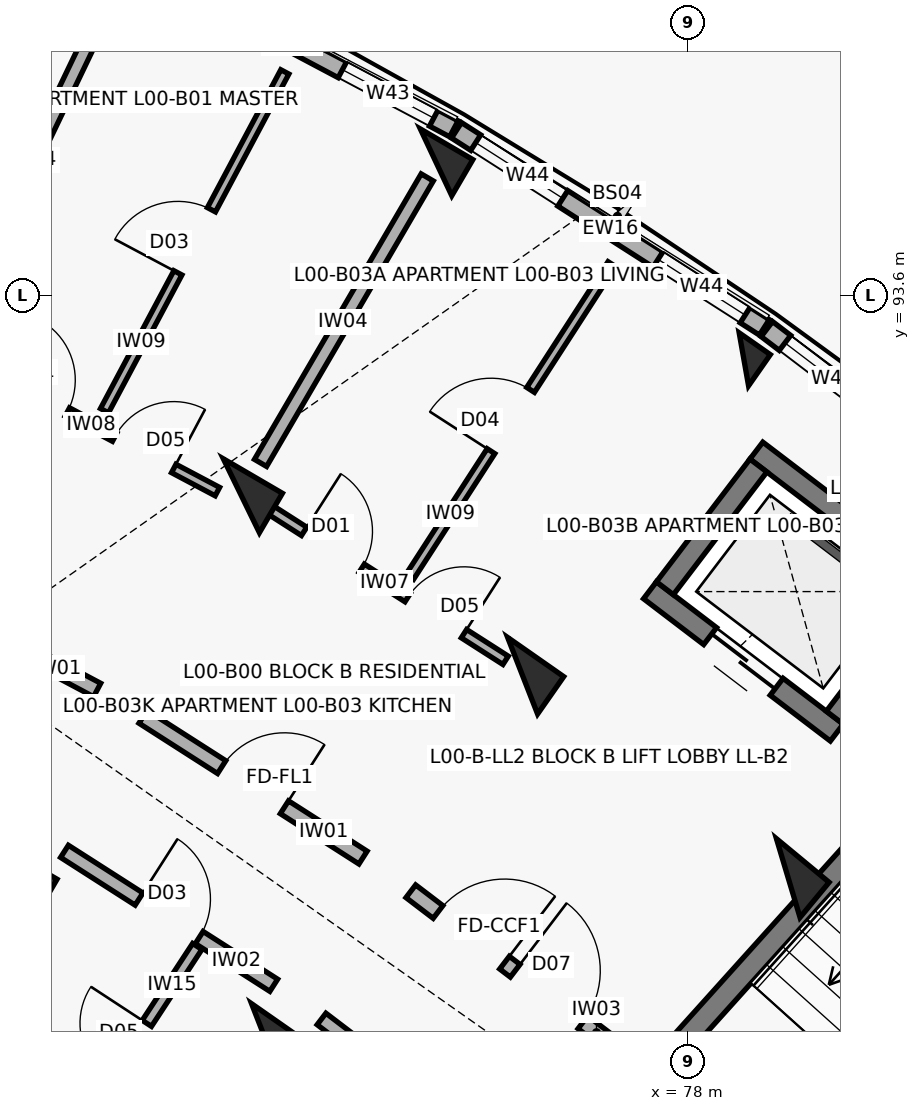
"""IFC4 building model, lengths in metres.
Left out: names, types, materials, properties, quantities, classifications, styles, units other than length and angle.
Written with IfcOpenShell. Run it as: python <this file> out.ifc"""

import sys

from ifc_helpers import new_model, si_unit, direction, frame, frame_2d, origin, origin_2d, place, context, subcontext, project, spatial, rectangle, extrude, element, fill, save


model = new_model("IFC4")
c1 = context("Model", 3, precision=1e-05, world=origin(), true_north=direction((0.0, 1.0)))
c2 = subcontext(c1, "Body", "Model", "MODEL_VIEW")
j1 = project(units=[si_unit("LENGTHUNIT", "METRE"), si_unit("PLANEANGLEUNIT", "RADIAN")], contexts=[c1])
p1 = place(None, origin())
s1 = spatial("IfcSite", under=j1, at=p1, CompositionType="ELEMENT")
p2 = place(p1, origin())
s2 = spatial("IfcBuilding", under=s1, at=p2, CompositionType="ELEMENT")
p3 = place(p2, origin())
s3 = spatial("IfcBuildingStorey", under=s2, at=p3, CompositionType="ELEMENT", Elevation=0.0)
for number, where, z_axis, x_axis in (
    (1, (69.163, 85.882, 0.0), (0.0, 0.0, 1.0), (0.504, 0.864, 0.0)),
    (2, (72.127, 90.96, 0.0), (0.0, 0.0, 1.0), (0.504, 0.864, 0.0)),
):
    element("IfcColumn", number, at=place(p3, frame(where, z_axis=z_axis, x_axis=x_axis)), inside=s3, PredefinedType="COLUMN", context=c2, shape_type="SweptSolid", body=[
        extrude(rectangle(XDim=0.6, YDim=0.9, at=origin_2d()), origin(), (0.0, 0.0, 1.0), 4.5),
    ])
p4 = place(p3, frame((74.689, 95.347, 0.0), z_axis=(0.0, 0.0, 1.0), x_axis=(0.504226211181, 0.863571611366, 0.0)))
e3 = element("IfcColumn", 3, at=p4, inside=s3, PredefinedType="COLUMN", context=c2, shape_type="SweptSolid", body=[
    extrude(rectangle(XDim=0.55, YDim=0.8, at=origin_2d()), origin(), (0.0, 0.0, 1.0), 4.5),
])
for number, where, z_axis, x_axis in (
    (4, (72.458, 83.773, 0.0), (0.0, 0.0, 1.0), (0.573, 0.82, 0.0)),
    (5, (75.828, 88.592, 0.0), (0.0, 0.0, 1.0), (0.573, 0.82, 0.0)),
):
    element("IfcColumn", number, at=place(p3, frame(where, z_axis=z_axis, x_axis=x_axis)), inside=s3, PredefinedType="COLUMN", context=c2, shape_type="SweptSolid", body=[
        extrude(rectangle(XDim=0.6, YDim=0.9, at=origin_2d()), origin(), (0.0, 0.0, 1.0), 4.5),
    ])
p5 = place(p3, frame((78.739, 92.755, 0.0), z_axis=(0.0, 0.0, 1.0), x_axis=(0.573004420611, 0.819552276527, 0.0)))
e6 = element("IfcColumn", 6, at=p5, inside=s3, PredefinedType="COLUMN", context=c2, shape_type="SweptSolid", body=[
    extrude(rectangle(XDim=0.5, YDim=0.5, at=origin_2d()), origin(), (0.0, 0.0, 1.0), 4.5),
])
p6 = place(p3, frame((79.322, 85.93, 0.0), z_axis=(0.0, 0.0, 1.0), x_axis=(0.637961754089, 0.770068049148, 0.0)))
e7 = element("IfcColumn", 7, at=p6, inside=s3, PredefinedType="COLUMN", context=c2, shape_type="SweptSolid", body=[
    extrude(rectangle(XDim=0.6, YDim=0.9, at=origin_2d()), origin(), (0.0, 0.0, 1.0), 4.5),
])
p7 = place(p3, frame((70.675, 98.042, 0.0), z_axis=(0.0, 0.0, 1.0), x_axis=(0.883448093208, -0.468529045639, 0.0)))
e8 = element("IfcWall", 8, at=p7, inside=s3, PredefinedType="SOLIDWALL", context=c2, shape_type="SweptSolid", body=[
    extrude(rectangle(XDim=4.809, YDim=0.238, at=frame_2d((2.405, 0.0))), origin(), (0.0, 0.0, 1.0), 3.45),
])
p8 = place(p7, frame((0.3, 0.0, 0.3)))
e9 = element("IfcOpeningElement", 9, at=p8, cuts=e8, PredefinedType="OPENING", context=c2, shape_type="SweptSolid", body=[
    extrude(rectangle(XDim=1.36, YDim=1.42, at=frame_2d((0.68, 0.71))), frame((0.0, 0.129, 0.0), z_axis=(0.0, -1.0, 0.0), x_axis=(1.0, 0.0, 0.0)), (0.0, 0.0, 1.0), 0.258),
])
p9 = place(p7, frame((3.149, 0.0, 0.3)))
e10 = element("IfcOpeningElement", 10, at=p9, cuts=e8, PredefinedType="OPENING", context=c2, shape_type="SweptSolid", body=[
    extrude(rectangle(XDim=1.36, YDim=1.42, at=frame_2d((0.68, 0.71))), frame((0.0, 0.129, 0.0), z_axis=(0.0, -1.0, 0.0), x_axis=(1.0, 0.0, 0.0)), (0.0, 0.0, 1.0), 0.258),
])
p10 = place(p3, frame((74.958, 95.768, 0.0), z_axis=(0.0, 0.0, 1.0), x_axis=(0.84226218024, -0.539068103061, 0.0)))
e11 = element("IfcWall", 11, at=p10, inside=s3, PredefinedType="SOLIDWALL", context=c2, shape_type="SweptSolid", body=[
    extrude(rectangle(XDim=4.809, YDim=0.242, at=frame_2d((2.404, 0.0))), origin(), (0.0, 0.0, 1.0), 3.45),
])
p11 = place(p10, frame((0.3, 0.0, 0.3)))
e12 = element("IfcOpeningElement", 12, at=p11, cuts=e11, PredefinedType="OPENING", context=c2, shape_type="SweptSolid", body=[
    extrude(rectangle(XDim=1.36, YDim=1.56, at=frame_2d((0.68, 0.78))), frame((0.0, 0.131, 0.0), z_axis=(0.0, -1.0, 0.0), x_axis=(1.0, 0.0, 0.0)), (0.0, 0.0, 1.0), 0.262),
])
p12 = place(p10, frame((3.149, 0.0, 0.3)))
e13 = element("IfcOpeningElement", 13, at=p12, cuts=e11, PredefinedType="OPENING", context=c2, shape_type="SweptSolid", body=[
    extrude(rectangle(XDim=1.36, YDim=1.56, at=frame_2d((0.68, 0.78))), frame((0.0, 0.131, 0.0), z_axis=(0.0, -1.0, 0.0), x_axis=(1.0, 0.0, 0.0)), (0.0, 0.0, 1.0), 0.262),
])
p13 = place(p3, frame((79.041, 93.153, 0.0), z_axis=(0.0, 0.0, 1.0), x_axis=(0.795469013207, -0.605994264848, 0.0)))
e14 = element("IfcWall", 14, at=p13, inside=s3, PredefinedType="SOLIDWALL", context=c2, shape_type="SweptSolid", body=[
    extrude(rectangle(XDim=4.809, YDim=0.248, at=frame_2d((2.404, 0.0))), origin(), (0.0, 0.0, 1.0), 3.45),
])
p14 = place(p13, frame((0.3, 0.0, 0.3)))
e15 = element("IfcOpeningElement", 15, at=p14, cuts=e14, PredefinedType="OPENING", context=c2, shape_type="SweptSolid", body=[
    extrude(rectangle(XDim=1.48, YDim=1.16, at=frame_2d((0.74, 0.58))), frame((0.0, 0.134, 0.0), z_axis=(0.0, -1.0, 0.0), x_axis=(1.0, 0.0, 0.0)), (0.0, 0.0, 1.0), 0.268),
])
p15 = place(p13, frame((3.029, 0.0, 0.3)))
e16 = element("IfcOpeningElement", 16, at=p15, cuts=e14, PredefinedType="OPENING", context=c2, shape_type="SweptSolid", body=[
    extrude(rectangle(XDim=1.48, YDim=1.16, at=frame_2d((0.74, 0.58))), frame((0.0, 0.134, 0.0), z_axis=(0.0, -1.0, 0.0), x_axis=(1.0, 0.0, 0.0)), (0.0, 0.0, 1.0), 0.268),
])
p16 = place(p3, frame((77.655, 83.461, 0.0), z_axis=(0.0, 0.0, 1.0), x_axis=(0.668868253964, 0.743380964808, 0.0)))
e17 = element("IfcWall", 17, at=p16, inside=s3, PredefinedType="SHEAR", context=c2, shape_type="SweptSolid", body=[
    extrude(rectangle(XDim=7.69, YDim=0.3, at=frame_2d((3.845, 0.0))), origin(), (0.0, 0.0, 1.0), 4.5),
])
p17 = place(p3, frame((79.961, 87.844, 0.0), z_axis=(0.0, 0.0, 1.0), x_axis=(-0.795464365424, 0.606000365793, 0.0)))
e18 = element("IfcWall", 18, at=p17, inside=s3, PredefinedType="SHEAR", context=c2, shape_type="SweptSolid", body=[
    extrude(rectangle(XDim=3.09, YDim=0.28, at=frame_2d((1.545, 0.0))), origin(), (0.0, 0.0, 1.0), 4.5),
])
p18 = place(p17, frame((0.995, 0.0, 0.0)))
e19 = element("IfcOpeningElement", 19, at=p18, cuts=e18, PredefinedType="OPENING", context=c2, shape_type="SweptSolid", body=[
    extrude(rectangle(XDim=1.1, YDim=2.15, at=frame_2d((0.55, 1.075))), frame((0.0, 0.15, 0.0), z_axis=(0.0, -1.0, 0.0), x_axis=(1.0, 0.0, 0.0)), (0.0, 0.0, 1.0), 0.3),
])
p19 = place(p3, frame((81.361, 89.681, 0.0), z_axis=(0.0, 0.0, 1.0), x_axis=(-0.795502452183, 0.605950368076, 0.0)))
e20 = element("IfcWall", 20, at=p19, inside=s3, PredefinedType="SHEAR", context=c2, shape_type="SweptSolid", body=[
    extrude(rectangle(XDim=3.09, YDim=0.28, at=frame_2d((1.545, 0.0))), origin(), (0.0, 0.0, 1.0), 4.5),
])
for number, where, z_axis, x_axis in (
    (21, (79.935, 88.04, 0.0), (0.0, 0.0, 1.0), (0.606, 0.795, 0.0)),
    (22, (77.699, 89.743, 0.0), (0.0, 0.0, 1.0), (0.606, 0.795, 0.0)),
):
    element("IfcWall", number, at=place(p3, frame(where, z_axis=z_axis, x_axis=x_axis)), inside=s3, PredefinedType="SHEAR", context=c2, shape_type="SweptSolid", body=[
        extrude(rectangle(XDim=2.03, YDim=0.28, at=frame_2d((1.015, 0.0))), origin(), (0.0, 0.0, 1.0), 4.5),
    ])
p20 = place(p3, frame((67.194, 90.014, 0.0), z_axis=(0.0, 0.0, 1.0), x_axis=(0.883410853063, -0.468599258099, 0.0)))
e23 = element("IfcWall", 23, at=p20, inside=s3, PredefinedType="SOLIDWALL", context=c2, shape_type="SweptSolid", body=[
    extrude(rectangle(XDim=3.436, YDim=0.2, at=frame_2d((1.718, 0.0))), origin(), (0.0, 0.0, 1.0), 3.34),
])
p21 = place(p20, frame((1.208, 0.0, 0.0)))
e24 = element("IfcOpeningElement", 24, at=p21, cuts=e23, PredefinedType="OPENING", context=c2, shape_type="SweptSolid", body=[
    extrude(rectangle(XDim=1.02, YDim=2.15, at=frame_2d((0.51, 1.075))), frame((0.0, 0.11, 0.0), z_axis=(0.0, -1.0, 0.0), x_axis=(1.0, 0.0, 0.0)), (0.0, 0.0, 1.0), 0.22),
])
p22 = place(p3, frame((68.468, 92.788, 0.0), z_axis=(0.0, 0.0, 1.0), x_axis=(0.883450371448, -0.468524749814, 0.0)))
e25 = element("IfcWall", 25, at=p22, inside=s3, PredefinedType="PARTITIONING", context=c2, shape_type="SweptSolid", body=[
    extrude(rectangle(XDim=3.785, YDim=0.125, at=frame_2d((1.893, 0.0))), origin(), (0.0, 0.0, 1.0), 3.34),
])
p23 = place(p22, frame((0.65, 0.0, 0.0)))
e26 = element("IfcOpeningElement", 26, at=p23, cuts=e25, PredefinedType="OPENING", context=c2, shape_type="SweptSolid", body=[
    extrude(rectangle(XDim=0.9, YDim=2.1, at=frame_2d((0.45, 1.05))), frame((0.0, 0.073, 0.0), z_axis=(0.0, -1.0, 0.0), x_axis=(1.0, 0.0, 0.0)), (0.0, 0.0, 1.0), 0.145),
])
p24 = place(p22, frame((2.255, 0.0, 0.0)))
e27 = element("IfcOpeningElement", 27, at=p24, cuts=e25, PredefinedType="OPENING", context=c2, shape_type="SweptSolid", body=[
    extrude(rectangle(XDim=0.88, YDim=2.1, at=frame_2d((0.44, 1.05))), frame((0.0, 0.073, 0.0), z_axis=(0.0, -1.0, 0.0), x_axis=(1.0, 0.0, 0.0)), (0.0, 0.0, 1.0), 0.145),
])
p25 = place(p3, frame((70.326, 92.079, 0.0), z_axis=(0.0, 0.0, 1.0), x_axis=(0.469847866249, 0.882747405876, 0.0)))
e28 = element("IfcWall", 28, at=p25, inside=s3, PredefinedType="PARTITIONING", context=c2, shape_type="SweptSolid", body=[
    extrude(rectangle(XDim=5.05, YDim=0.12, at=frame_2d((2.525, 0.0))), origin(), (0.0, 0.0, 1.0), 3.34),
])
p26 = place(p25, frame((2.055, 0.0, 0.0)))
e29 = element("IfcOpeningElement", 29, at=p26, cuts=e28, PredefinedType="OPENING", context=c2, shape_type="SweptSolid", body=[
    extrude(rectangle(XDim=0.94, YDim=2.1, at=frame_2d((0.47, 1.05))), frame((0.0, 0.07, 0.0), z_axis=(0.0, -1.0, 0.0), x_axis=(1.0, 0.0, 0.0)), (0.0, 0.0, 1.0), 0.14),
])
p27 = place(p3, frame((68.462, 93.469, 0.0), z_axis=(0.0, 0.0, 1.0), x_axis=(0.432086898897, 0.901831975371, 0.0)))
e30 = element("IfcWall", 30, at=p27, inside=s3, PredefinedType="SOLIDWALL", context=c2, shape_type="SweptSolid", body=[
    extrude(rectangle(XDim=4.35, YDim=0.185, at=frame_2d((2.175, 0.0))), origin(), (0.0, 0.0, 1.0), 3.34),
])
p28 = place(p3, frame((70.834, 88.051, 0.0), z_axis=(0.0, 0.0, 1.0), x_axis=(0.842257205985, -0.539075874963, 0.0)))
e31 = element("IfcWall", 31, at=p28, inside=s3, PredefinedType="SOLIDWALL", context=c2, shape_type="SweptSolid", body=[
    extrude(rectangle(XDim=3.436, YDim=0.2, at=frame_2d((1.718, 0.0))), origin(), (0.0, 0.0, 1.0), 3.34),
])
p29 = place(p28, frame((1.228, 0.0, 0.0)))
e32 = element("IfcOpeningElement", 32, at=p29, cuts=e31, PredefinedType="OPENING", context=c2, shape_type="SweptSolid", body=[
    extrude(rectangle(XDim=0.98, YDim=2.15, at=frame_2d((0.49, 1.075))), frame((0.0, 0.11, 0.0), z_axis=(0.0, -1.0, 0.0), x_axis=(1.0, 0.0, 0.0)), (0.0, 0.0, 1.0), 0.22),
])
p30 = place(p3, frame((69.8, 86.281, 0.0), z_axis=(0.0, 0.0, 1.0), x_axis=(0.842225276846, -0.539125758095, 0.0)))
e33 = element("IfcWall", 33, at=p30, inside=s3, PredefinedType="SOLIDWALL", context=c2, shape_type="SweptSolid", body=[
    extrude(rectangle(XDim=3.269, YDim=0.19, at=frame_2d((1.634, 0.0))), origin(), (0.0, 0.0, 1.0), 3.34),
])
p31 = place(p30, frame((1.164, 0.0, 0.0)))
e34 = element("IfcOpeningElement", 34, at=p31, cuts=e33, PredefinedType="OPENING", context=c2, shape_type="SweptSolid", body=[
    extrude(rectangle(XDim=0.94, YDim=2.1, at=frame_2d((0.47, 1.05))), frame((0.0, 0.105, 0.0), z_axis=(0.0, -1.0, 0.0), x_axis=(1.0, 0.0, 0.0)), (0.0, 0.0, 1.0), 0.21),
])
p32 = place(p3, frame((69.739, 82.269, 0.0), z_axis=(0.0, 0.0, 1.0), x_axis=(0.547920940513, 0.836530120765, 0.0)))
e35 = element("IfcWall", 35, at=p32, inside=s3, PredefinedType="PARTITIONING", context=c2, shape_type="SweptSolid", body=[
    extrude(rectangle(XDim=3.3, YDim=0.145, at=frame_2d((1.65, 0.0))), origin(), (0.0, 0.0, 1.0), 3.34),
])
p33 = place(p32, frame((1.21, 0.0, 0.0)))
e36 = element("IfcOpeningElement", 36, at=p33, cuts=e35, PredefinedType="OPENING", context=c2, shape_type="SweptSolid", body=[
    extrude(rectangle(XDim=0.88, YDim=2.1, at=frame_2d((0.44, 1.05))), frame((0.0, 0.083, 0.0), z_axis=(0.0, -1.0, 0.0), x_axis=(1.0, 0.0, 0.0)), (0.0, 0.0, 1.0), 0.165),
])
p34 = place(p3, frame((72.405, 90.842, 0.0), z_axis=(0.0, 0.0, 1.0), x_axis=(0.842271400662, -0.539053696423, 0.0)))
e37 = element("IfcWall", 37, at=p34, inside=s3, PredefinedType="PARTITIONING", context=c2, shape_type="SweptSolid", body=[
    extrude(rectangle(XDim=3.797, YDim=0.13, at=frame_2d((1.898, 0.0))), origin(), (0.0, 0.0, 1.0), 3.34),
])
p35 = place(p34, frame((0.65, 0.0, 0.0)))
e38 = element("IfcOpeningElement", 38, at=p35, cuts=e37, PredefinedType="OPENING", context=c2, shape_type="SweptSolid", body=[
    extrude(rectangle(XDim=0.9, YDim=2.1, at=frame_2d((0.45, 1.05))), frame((0.0, 0.075, 0.0), z_axis=(0.0, -1.0, 0.0), x_axis=(1.0, 0.0, 0.0)), (0.0, 0.0, 1.0), 0.15),
])
p36 = place(p34, frame((2.267, 0.0, 0.0)))
e39 = element("IfcOpeningElement", 39, at=p36, cuts=e37, PredefinedType="OPENING", context=c2, shape_type="SweptSolid", body=[
    extrude(rectangle(XDim=0.88, YDim=2.1, at=frame_2d((0.44, 1.05))), frame((0.0, 0.075, 0.0), z_axis=(0.0, -1.0, 0.0), x_axis=(1.0, 0.0, 0.0)), (0.0, 0.0, 1.0), 0.15),
])
p37 = place(p3, frame((74.342, 89.892, 0.0), z_axis=(0.0, 0.0, 1.0), x_axis=(0.542871109654, 0.839816026462, 0.0)))
e40 = element("IfcWall", 40, at=p37, inside=s3, PredefinedType="PARTITIONING", context=c2, shape_type="SweptSolid", body=[
    extrude(rectangle(XDim=4.9, YDim=0.12, at=frame_2d((2.45, 0.0))), origin(), (0.0, 0.0, 1.0), 3.34),
])
p38 = place(p37, frame((1.97, 0.0, 0.0)))
e41 = element("IfcOpeningElement", 41, at=p38, cuts=e40, PredefinedType="OPENING", context=c2, shape_type="SweptSolid", body=[
    extrude(rectangle(XDim=0.96, YDim=2.1, at=frame_2d((0.48, 1.05))), frame((0.0, 0.07, 0.0), z_axis=(0.0, -1.0, 0.0), x_axis=(1.0, 0.0, 0.0)), (0.0, 0.0, 1.0), 0.14),
])
p39 = place(p3, frame((72.379, 91.392, 0.0), z_axis=(0.0, 0.0, 1.0), x_axis=(0.504216452091, 0.863577309475, 0.0)))
e42 = element("IfcWall", 42, at=p39, inside=s3, PredefinedType="SOLIDWALL", context=c2, shape_type="SweptSolid", body=[
    extrude(rectangle(XDim=4.35, YDim=0.185, at=frame_2d((2.175, 0.0))), origin(), (0.0, 0.0, 1.0), 3.34),
])
p40 = place(p3, frame((74.357, 85.756, 0.0), z_axis=(0.0, 0.0, 1.0), x_axis=(0.795498026433, -0.605956178235, 0.0)))
e43 = element("IfcWall", 43, at=p40, inside=s3, PredefinedType="SOLIDWALL", context=c2, shape_type="SweptSolid", body=[
    extrude(rectangle(XDim=3.296, YDim=0.21, at=frame_2d((1.648, 0.0))), origin(), (0.0, 0.0, 1.0), 3.34),
])
p41 = place(p40, frame((0.45, 0.0, 0.0)))
e44 = element("IfcOpeningElement", 44, at=p41, cuts=e43, PredefinedType="OPENING", context=c2, shape_type="SweptSolid", body=[
    extrude(rectangle(XDim=1.1, YDim=2.15, at=frame_2d((0.55, 1.075))), frame((0.0, 0.115, 0.0), z_axis=(0.0, -1.0, 0.0), x_axis=(1.0, 0.0, 0.0)), (0.0, 0.0, 1.0), 0.23),
])
p42 = place(p40, frame((1.726, 0.0, 0.0)))
e45 = element("IfcOpeningElement", 45, at=p42, cuts=e43, PredefinedType="OPENING", context=c2, shape_type="SweptSolid", body=[
    extrude(rectangle(XDim=1.12, YDim=2.15, at=frame_2d((0.56, 1.075))), frame((0.0, 0.115, 0.0), z_axis=(0.0, -1.0, 0.0), x_axis=(1.0, 0.0, 0.0)), (0.0, 0.0, 1.0), 0.23),
])
p43 = place(p3, frame((73.182, 84.076, 0.0), z_axis=(0.0, 0.0, 1.0), x_axis=(0.795501577908, -0.605951515838, 0.0)))
e46 = element("IfcWall", 46, at=p43, inside=s3, PredefinedType="SOLIDWALL", context=c2, shape_type="SweptSolid", body=[
    extrude(rectangle(XDim=3.129, YDim=0.19, at=frame_2d((1.564, 0.0))), origin(), (0.0, 0.0, 1.0), 3.34),
])
p44 = place(p43, frame((1.004, 0.0, 0.0)))
e47 = element("IfcOpeningElement", 47, at=p44, cuts=e46, PredefinedType="OPENING", context=c2, shape_type="SweptSolid", body=[
    extrude(rectangle(XDim=1.12, YDim=2.15, at=frame_2d((0.56, 1.075))), frame((0.0, 0.105, 0.0), z_axis=(0.0, -1.0, 0.0), x_axis=(1.0, 0.0, 0.0)), (0.0, 0.0, 1.0), 0.21),
])
p45 = place(p9, origin())
e48 = element("IfcWindow", 48, at=p45, inside=s3, PartitioningType="DOUBLE_PANEL_VERTICAL", PredefinedType="WINDOW", context=c2, shape_type="SweptSolid", body=[
    extrude(rectangle(XDim=1.36, YDim=1.42, at=frame_2d((0.68, 0.71))), frame((0.0, 0.03, 0.0), z_axis=(0.0, -1.0, 0.0), x_axis=(1.0, 0.0, 0.0)), (0.0, 0.0, 1.0), 0.06),
])
fill(e10, e48)
p46 = place(p11, origin())
e49 = element("IfcWindow", 49, at=p46, inside=s3, PartitioningType="DOUBLE_PANEL_VERTICAL", PredefinedType="WINDOW", context=c2, shape_type="SweptSolid", body=[
    extrude(rectangle(XDim=1.36, YDim=1.56, at=frame_2d((0.68, 0.78))), frame((0.0, 0.03, 0.0), z_axis=(0.0, -1.0, 0.0), x_axis=(1.0, 0.0, 0.0)), (0.0, 0.0, 1.0), 0.06),
])
fill(e12, e49)
p47 = place(p12, origin())
e50 = element("IfcWindow", 50, at=p47, inside=s3, PartitioningType="DOUBLE_PANEL_VERTICAL", PredefinedType="WINDOW", context=c2, shape_type="SweptSolid", body=[
    extrude(rectangle(XDim=1.36, YDim=1.56, at=frame_2d((0.68, 0.78))), frame((0.0, 0.03, 0.0), z_axis=(0.0, -1.0, 0.0), x_axis=(1.0, 0.0, 0.0)), (0.0, 0.0, 1.0), 0.06),
])
fill(e13, e50)
p48 = place(p14, origin())
e51 = element("IfcWindow", 51, at=p48, inside=s3, PartitioningType="DOUBLE_PANEL_VERTICAL", PredefinedType="WINDOW", context=c2, shape_type="SweptSolid", body=[
    extrude(rectangle(XDim=1.48, YDim=1.16, at=frame_2d((0.74, 0.58))), frame((0.0, 0.03, 0.0), z_axis=(0.0, -1.0, 0.0), x_axis=(1.0, 0.0, 0.0)), (0.0, 0.0, 1.0), 0.06),
])
fill(e15, e51)
p49 = place(p18, origin())
e52 = element("IfcDoor", 52, at=p49, inside=s3, OperationType="DOUBLE_DOOR_SLIDING", PredefinedType="DOOR", context=c2, shape_type="SweptSolid", body=[
    extrude(rectangle(XDim=1.1, YDim=2.15, at=frame_2d((0.55, 1.075))), frame((0.0, 0.025, 0.0), z_axis=(0.0, -1.0, 0.0), x_axis=(1.0, 0.0, 0.0)), (0.0, 0.0, 1.0), 0.05),
])
fill(e19, e52)
p50 = place(p23, origin())
e53 = element("IfcDoor", 53, at=p50, inside=s3, OperationType="SINGLE_SWING_LEFT", PredefinedType="DOOR", context=c2, shape_type="SweptSolid", body=[
    extrude(rectangle(XDim=0.9, YDim=2.1, at=frame_2d((0.45, 1.05))), frame((0.0, 0.025, 0.0), z_axis=(0.0, -1.0, 0.0), x_axis=(1.0, 0.0, 0.0)), (0.0, 0.0, 1.0), 0.05),
])
fill(e26, e53)
p51 = place(p24, origin())
e54 = element("IfcDoor", 54, at=p51, inside=s3, OperationType="SINGLE_SWING_RIGHT", PredefinedType="DOOR", context=c2, shape_type="SweptSolid", body=[
    extrude(rectangle(XDim=0.88, YDim=2.1, at=frame_2d((0.44, 1.05))), frame((0.0, 0.025, 0.0), z_axis=(0.0, -1.0, 0.0), x_axis=(1.0, 0.0, 0.0)), (0.0, 0.0, 1.0), 0.05),
])
fill(e27, e54)
p52 = place(p26, origin())
e55 = element("IfcDoor", 55, at=p52, inside=s3, OperationType="SINGLE_SWING_LEFT", PredefinedType="DOOR", context=c2, shape_type="SweptSolid", body=[
    extrude(rectangle(XDim=0.94, YDim=2.1, at=frame_2d((0.47, 1.05))), frame((0.0, 0.025, 0.0), z_axis=(0.0, -1.0, 0.0), x_axis=(1.0, 0.0, 0.0)), (0.0, 0.0, 1.0), 0.05),
])
fill(e29, e55)
p53 = place(p29, origin())
e56 = element("IfcDoor", 56, at=p53, inside=s3, OperationType="SINGLE_SWING_RIGHT", PredefinedType="DOOR", context=c2, shape_type="SweptSolid", body=[
    extrude(rectangle(XDim=0.98, YDim=2.15, at=frame_2d((0.49, 1.075))), frame((0.0, 0.025, 0.0), z_axis=(0.0, -1.0, 0.0), x_axis=(1.0, 0.0, 0.0)), (0.0, 0.0, 1.0), 0.05),
])
fill(e32, e56)
p54 = place(p31, origin())
e57 = element("IfcDoor", 57, at=p54, inside=s3, OperationType="SINGLE_SWING_LEFT", PredefinedType="DOOR", context=c2, shape_type="SweptSolid", body=[
    extrude(rectangle(XDim=0.94, YDim=2.1, at=frame_2d((0.47, 1.05))), frame((0.0, 0.025, 0.0), z_axis=(0.0, -1.0, 0.0), x_axis=(1.0, 0.0, 0.0)), (0.0, 0.0, 1.0), 0.05),
])
fill(e34, e57)
p55 = place(p33, origin())
e58 = element("IfcDoor", 58, at=p55, inside=s3, OperationType="SINGLE_SWING_RIGHT", PredefinedType="DOOR", context=c2, shape_type="SweptSolid", body=[
    extrude(rectangle(XDim=0.88, YDim=2.1, at=frame_2d((0.44, 1.05))), frame((0.0, 0.025, 0.0), z_axis=(0.0, -1.0, 0.0), x_axis=(1.0, 0.0, 0.0)), (0.0, 0.0, 1.0), 0.05),
])
fill(e36, e58)
p56 = place(p35, origin())
e59 = element("IfcDoor", 59, at=p56, inside=s3, OperationType="SINGLE_SWING_LEFT", PredefinedType="DOOR", context=c2, shape_type="SweptSolid", body=[
    extrude(rectangle(XDim=0.9, YDim=2.1, at=frame_2d((0.45, 1.05))), frame((0.0, 0.025, 0.0), z_axis=(0.0, -1.0, 0.0), x_axis=(1.0, 0.0, 0.0)), (0.0, 0.0, 1.0), 0.05),
])
fill(e38, e59)
p57 = place(p36, origin())
e60 = element("IfcDoor", 60, at=p57, inside=s3, OperationType="SINGLE_SWING_RIGHT", PredefinedType="DOOR", context=c2, shape_type="SweptSolid", body=[
    extrude(rectangle(XDim=0.88, YDim=2.1, at=frame_2d((0.44, 1.05))), frame((0.0, 0.025, 0.0), z_axis=(0.0, -1.0, 0.0), x_axis=(1.0, 0.0, 0.0)), (0.0, 0.0, 1.0), 0.05),
])
fill(e39, e60)
p58 = place(p38, origin())
e61 = element("IfcDoor", 61, at=p58, inside=s3, OperationType="SINGLE_SWING_LEFT", PredefinedType="DOOR", context=c2, shape_type="SweptSolid", body=[
    extrude(rectangle(XDim=0.96, YDim=2.1, at=frame_2d((0.48, 1.05))), frame((0.0, 0.025, 0.0), z_axis=(0.0, -1.0, 0.0), x_axis=(1.0, 0.0, 0.0)), (0.0, 0.0, 1.0), 0.05),
])
fill(e41, e61)
p59 = place(p41, origin())
e62 = element("IfcDoor", 62, at=p59, inside=s3, OperationType="SINGLE_SWING_RIGHT", PredefinedType="DOOR", context=c2, shape_type="SweptSolid", body=[
    extrude(rectangle(XDim=1.1, YDim=2.15, at=frame_2d((0.55, 1.075))), frame((0.0, 0.025, 0.0), z_axis=(0.0, -1.0, 0.0), x_axis=(1.0, 0.0, 0.0)), (0.0, 0.0, 1.0), 0.05),
])
fill(e44, e62)
p60 = place(p42, origin())
e63 = element("IfcDoor", 63, at=p60, inside=s3, OperationType="SINGLE_SWING_LEFT", PredefinedType="DOOR", context=c2, shape_type="SweptSolid", body=[
    extrude(rectangle(XDim=1.12, YDim=2.15, at=frame_2d((0.56, 1.075))), frame((0.0, 0.025, 0.0), z_axis=(0.0, -1.0, 0.0), x_axis=(1.0, 0.0, 0.0)), (0.0, 0.0, 1.0), 0.05),
])
fill(e45, e63)
save(model, sys.argv[1])
